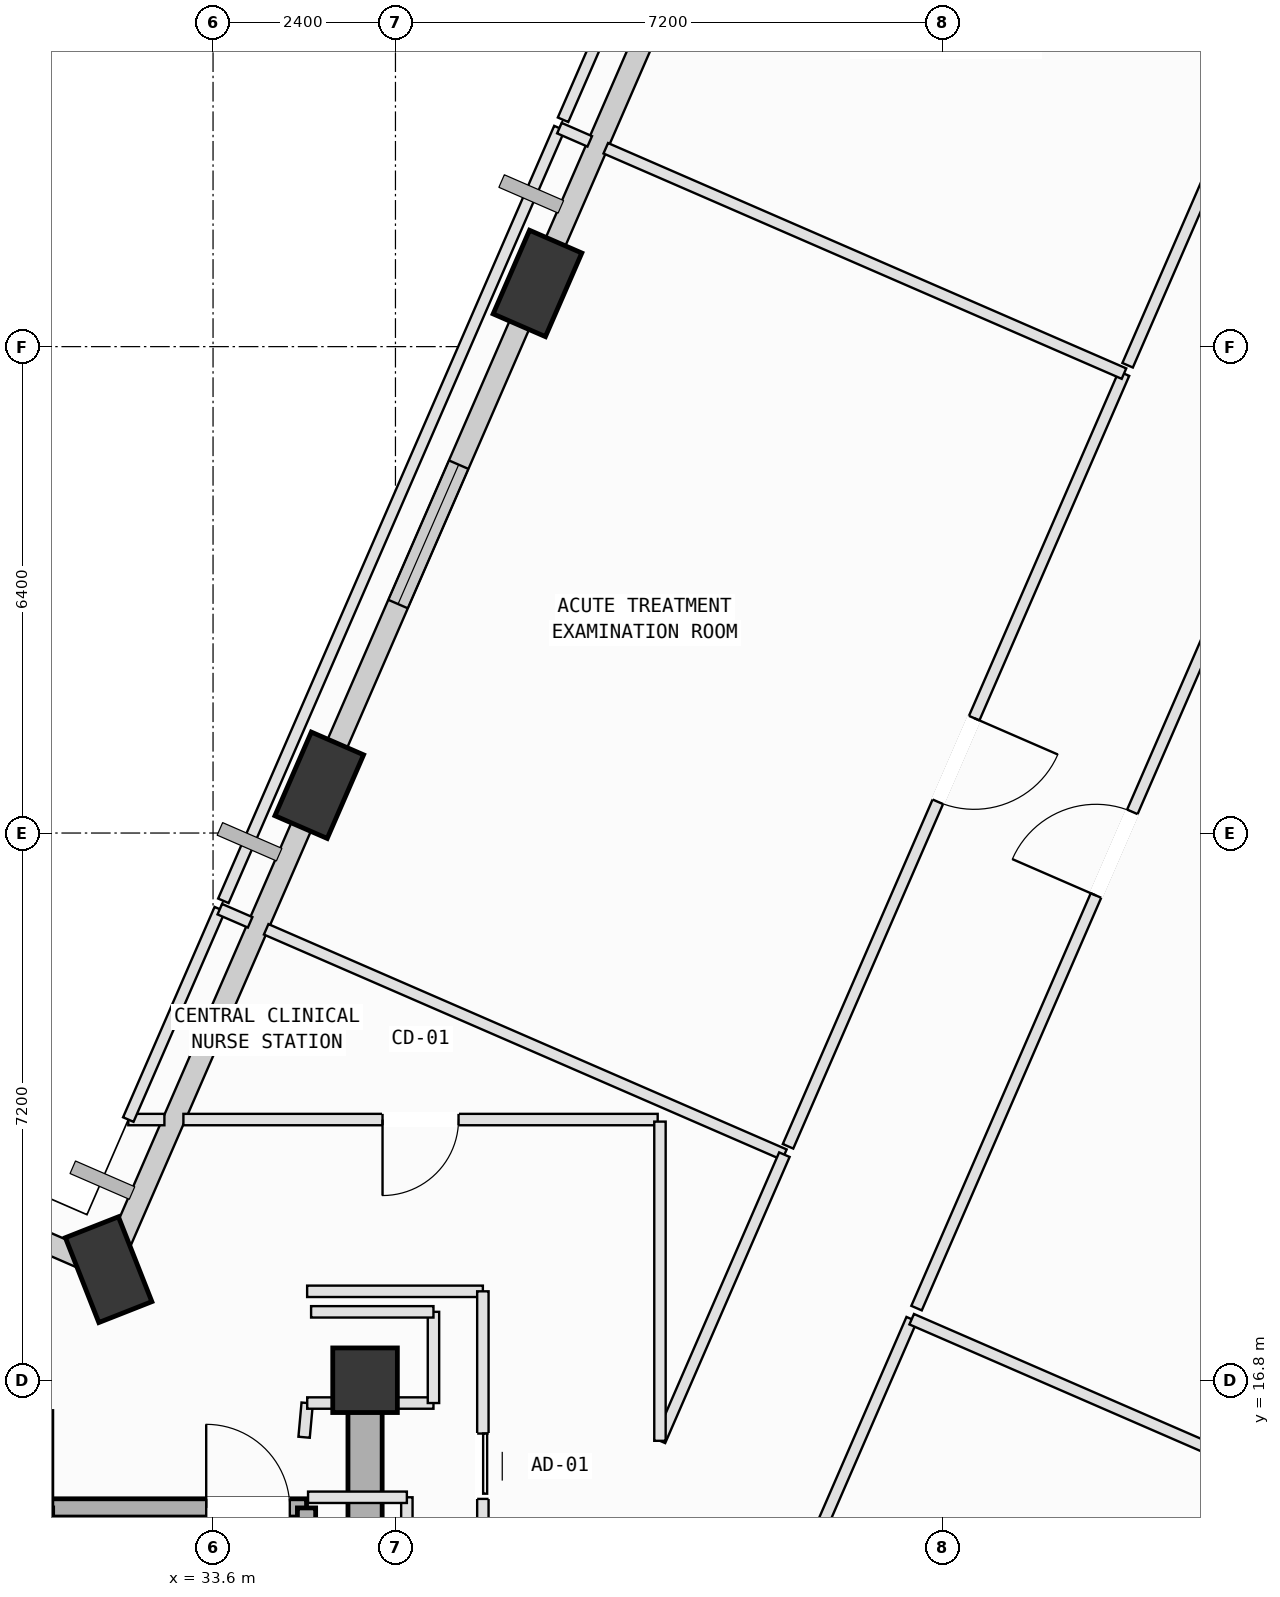
"""IFC4 building model, lengths in metres.
Left out: names, types, materials, properties, quantities, classifications, styles, units other than length and angle.
Written with IfcOpenShell. Run it as: python <this file> out.ifc"""

import sys

from ifc_helpers import new_model, si_unit, direction, frame, frame_2d, origin, origin_2d, place, context, subcontext, project, spatial, rectangle, extrude, element, fill, save


model = new_model("IFC4")
c1 = context("Model", 3, precision=1e-05, world=origin(), true_north=direction((0.0, 1.0)))
c2 = subcontext(c1, "Body", "Model", "MODEL_VIEW")
j1 = project(units=[si_unit("LENGTHUNIT", "METRE"), si_unit("PLANEANGLEUNIT", "RADIAN")], contexts=[c1])
p1 = place(None, origin())
s1 = spatial("IfcSite", under=j1, at=p1, CompositionType="ELEMENT")
p2 = place(p1, origin())
s2 = spatial("IfcBuilding", under=s1, at=p2, CompositionType="ELEMENT")
p3 = place(p2, frame((0.0, 0.0, 316.6)))
s3 = spatial("IfcBuildingStorey", under=s2, at=p3, CompositionType="ELEMENT", Elevation=316.6)
p4 = place(p3, frame((35.6, 16.8, 0.0), z_axis=(0.0, 0.0, 1.0), x_axis=(1.0, 0.0, 0.0)))
e1 = element("IfcColumn", 1, at=p4, inside=s3, PredefinedType="COLUMN", context=c2, shape_type="SweptSolid", body=[
    extrude(rectangle(XDim=0.85, YDim=0.85, at=origin_2d()), origin(), (0.0, 0.0, 1.0), 4.0),
])
for number, where, z_axis, x_axis in (
    (2, (37.868, 31.231, 0.002), (0.0, 0.0, 1.0), (0.399, 0.917, 0.0)),
    (3, (34.998, 24.628, 0.002), (0.0, 0.0, 1.0), (0.399, 0.917, 0.0)),
    (4, (32.226, 18.255, 0.002), (0.0, 0.0, 1.0), (-0.367, 0.93, 0.0)),
):
    element("IfcColumn", number, at=place(p3, frame(where, z_axis=z_axis, x_axis=x_axis)), inside=s3, PredefinedType="COLUMN", context=c2, shape_type="SweptSolid", body=[
        extrude(rectangle(XDim=1.2, YDim=0.75, at=origin_2d()), origin(), (0.0, 0.0, 1.0), 3.996),
    ])
p5 = place(p3, frame((38.027, 31.596, 0.0), z_axis=(0.0, 0.0, 1.0), x_axis=(0.398764437463, 0.917053391802, 0.0)))
e5 = element("IfcWall", 5, at=p5, inside=s3, PredefinedType="SOLIDWALL", context=c2, shape_type="SweptSolid", body=[
    extrude(rectangle(XDim=6.755, YDim=0.28, at=frame_2d((3.377, 0.0))), origin(), (0.0, 0.0, 1.0), 3.265),
])
p6 = place(p5, frame((3.538, 0.0, 0.75)))
e6 = element("IfcOpeningElement", 6, at=p6, cuts=e5, PredefinedType="OPENING", context=c2, shape_type="SweptSolid", body=[
    extrude(rectangle(XDim=1.6, YDim=1.95, at=frame_2d((0.8, 0.975))), frame((0.0, 0.15, 0.0), z_axis=(0.0, -1.0, 0.0), x_axis=(1.0, 0.0, 0.0)), (0.0, 0.0, 1.0), 0.3),
])
p7 = place(p3, frame((35.156, 24.993, 0.0), z_axis=(0.0, 0.0, 1.0), x_axis=(0.398758169539, 0.917056117272, 0.0)))
e7 = element("IfcWall", 7, at=p7, inside=s3, PredefinedType="SOLIDWALL", context=c2, shape_type="SweptSolid", body=[
    extrude(rectangle(XDim=6.405, YDim=0.28, at=frame_2d((3.202, 0.0))), origin(), (0.0, 0.0, 1.0), 3.265),
])
p8 = place(p7, frame((2.202, 0.0, 0.75)))
e8 = element("IfcOpeningElement", 8, at=p8, cuts=e7, PredefinedType="OPENING", context=c2, shape_type="SweptSolid", body=[
    extrude(rectangle(XDim=2.0, YDim=1.95, at=frame_2d((1.0, 0.975))), frame((0.0, 0.15, 0.0), z_axis=(0.0, -1.0, 0.0), x_axis=(1.0, 0.0, 0.0)), (0.0, 0.0, 1.0), 0.3),
])
p9 = place(p3, frame((32.385, 18.619, 0.0), z_axis=(0.0, 0.0, 1.0), x_axis=(0.398753668733, 0.917058074318, 0.0)))
e9 = element("IfcWall", 9, at=p9, inside=s3, PredefinedType="SOLIDWALL", context=c2, shape_type="SweptSolid", body=[
    extrude(rectangle(XDim=6.155, YDim=0.28, at=frame_2d((3.078, 0.0))), origin(), (0.0, 0.0, 1.0), 3.265),
])
p10 = place(p3, frame((25.484, 21.187, 0.0), z_axis=(0.0, 0.0, 1.0), x_axis=(0.917060568388, -0.398747932794, 0.0)))
e10 = element("IfcWall", 10, at=p10, inside=s3, PredefinedType="SOLIDWALL", context=c2, shape_type="SweptSolid", body=[
    extrude(rectangle(XDim=6.955, YDim=0.28, at=frame_2d((3.478, 0.0))), origin(), (0.0, 0.0, 1.0), 2.765),
])
p11 = place(p3, frame((31.37, 15.12, 0.0), z_axis=(0.0, 0.0, 1.0), x_axis=(1.0, 0.0, 0.0)))
e11 = element("IfcWall", 11, at=p11, inside=s3, PredefinedType="SOLIDWALL", context=c2, shape_type="SweptSolid", body=[
    extrude(rectangle(XDim=3.46, YDim=0.24, at=frame_2d((1.73, 0.0))), origin(), (0.0, 0.0, 1.0), 3.78),
])
p12 = place(p11, frame((2.14, 0.0, 0.0)))
e12 = element("IfcOpeningElement", 12, at=p12, cuts=e11, PredefinedType="OPENING", context=c2, shape_type="SweptSolid", body=[
    extrude(rectangle(XDim=1.1, YDim=2.15, at=frame_2d((0.55, 1.075))), frame((0.0, 0.13, 0.0), z_axis=(0.0, -1.0, 0.0), x_axis=(1.0, 0.0, 0.0)), (0.0, 0.0, 1.0), 0.26),
])
for number, where, z_axis, x_axis in (
    (13, (34.83, 15.12, 0.0), (0.0, 0.0, 1.0), (0.0, -1.0, 0.0)),
    (14, (31.37, 8.025, 0.0), (0.0, 0.0, 1.0), (0.0, 1.0, 0.0)),
):
    element("IfcWall", number, at=place(p3, frame(where, z_axis=z_axis, x_axis=x_axis)), inside=s3, PredefinedType="SOLIDWALL", context=c2, shape_type="SweptSolid", body=[
        extrude(rectangle(XDim=7.095, YDim=0.24, at=frame_2d((3.548, 0.0))), origin(), (0.0, 0.0, 1.0), 3.78),
    ])
p13 = place(p3, frame((35.6, 7.8, 0.0), z_axis=(0.0, 0.0, 1.0), x_axis=(0.0, 1.0, 0.0)))
e15 = element("IfcWall", 15, at=p13, inside=s3, PredefinedType="SHEAR", context=c2, shape_type="SweptSolid", body=[
    extrude(rectangle(XDim=9.0, YDim=0.45, at=frame_2d((4.5, 0.0))), origin(), (0.0, 0.0, 1.0), 3.78),
])
p14 = place(p3, frame((39.48, 9.984, 0.0), z_axis=(0.0, 0.0, 1.0), x_axis=(0.398659488131, 0.917099020021, 0.0)))
e16 = element("IfcWall", 16, at=p14, inside=s3, PredefinedType="PARTITIONING", context=c2, shape_type="SweptSolid", body=[
    extrude(rectangle(XDim=8.308, YDim=0.15, at=frame_2d((4.154, 0.0))), origin(), (0.0, 0.0, 1.0), 3.78),
])
p15 = place(p14, frame((3.554, 0.0, 0.0)))
e17 = element("IfcOpeningElement", 17, at=p15, cuts=e16, PredefinedType="OPENING", context=c2, shape_type="SweptSolid", body=[
    extrude(rectangle(XDim=1.2, YDim=2.15, at=frame_2d((0.6, 1.075))), frame((0.0, 0.085, 0.0), z_axis=(0.0, -1.0, 0.0), x_axis=(1.0, 0.0, 0.0)), (0.0, 0.0, 1.0), 0.17),
])
p16 = place(p3, frame((42.792, 17.603, 0.0), z_axis=(0.0, 0.0, 1.0), x_axis=(0.917063112739, -0.398742081117, 0.0)))
e18 = element("IfcWall", 18, at=p16, inside=s3, PredefinedType="PARTITIONING", context=c2, shape_type="SweptSolid", body=[
    extrude(rectangle(XDim=11.18, YDim=0.15, at=frame_2d((5.59, 0.0))), origin(), (0.0, 0.0, 1.0), 3.78),
])
p17 = place(p3, frame((42.856, 17.749, 0.0), z_axis=(0.0, 0.0, 1.0), x_axis=(0.398751440491, 0.917059043195, 0.0)))
e19 = element("IfcWall", 19, at=p17, inside=s3, PredefinedType="PARTITIONING", context=c2, shape_type="SweptSolid", body=[
    extrude(rectangle(XDim=13.041, YDim=0.15, at=frame_2d((6.52, 0.0))), origin(), (0.0, 0.0, 1.0), 3.78),
])
p18 = place(p17, frame((5.92, 0.0, 0.0)))
e20 = element("IfcOpeningElement", 20, at=p18, cuts=e19, PredefinedType="OPENING", context=c2, shape_type="SweptSolid", body=[
    extrude(rectangle(XDim=1.2, YDim=2.15, at=frame_2d((0.6, 1.075))), frame((0.0, 0.085, 0.0), z_axis=(0.0, -1.0, 0.0), x_axis=(1.0, 0.0, 0.0)), (0.0, 0.0, 1.0), 0.17),
])
p19 = place(p3, frame((39.45, 20.23, 0.0), z_axis=(0.0, 0.0, 1.0), x_axis=(-1.0, 0.0, 0.0)))
e21 = element("IfcWall", 21, at=p19, inside=s3, PredefinedType="PARTITIONING", context=c2, shape_type="SweptSolid", body=[
    extrude(rectangle(XDim=6.24, YDim=0.15, at=frame_2d((3.12, 0.0))), origin(), (0.0, 0.0, 1.0), 3.78),
])
p20 = place(p19, frame((2.62, 0.0, 0.0)))
e22 = element("IfcOpeningElement", 22, at=p20, cuts=e21, PredefinedType="OPENING", context=c2, shape_type="SweptSolid", body=[
    extrude(rectangle(XDim=1.0, YDim=2.12, at=frame_2d((0.5, 1.06))), frame((0.0, 0.085, 0.0), z_axis=(0.0, -1.0, 0.0), x_axis=(1.0, 0.0, 0.0)), (0.0, 0.0, 1.0), 0.17),
])
p21 = place(p3, frame((32.96, 20.23, 0.0), z_axis=(0.0, 0.0, 1.0), x_axis=(-1.0, 0.0, 0.0)))
e23 = element("IfcWall", 23, at=p21, inside=s3, PredefinedType="PARTITIONING", context=c2, shape_type="SweptSolid", body=[
    extrude(rectangle(XDim=0.475, YDim=0.15, at=frame_2d((0.237, 0.0))), origin(), (0.0, 0.0, 1.0), 3.78),
])
p22 = place(p3, frame((32.485, 20.23, 0.0), z_axis=(0.0, 0.0, 1.0), x_axis=(0.398823706297, 0.917027617521, 0.0)))
e24 = element("IfcWall", 24, at=p22, inside=s3, PredefinedType="PARTITIONING", context=c2, shape_type="SweptSolid", body=[
    extrude(rectangle(XDim=3.019, YDim=0.15, at=frame_2d((1.509, 0.0))), origin(), (0.0, 0.0, 1.0), 3.78),
])
p23 = place(p3, frame((33.689, 22.998, 0.0), z_axis=(0.0, 0.0, 1.0), x_axis=(0.91736435201, -0.398048546864, 0.0)))
e25 = element("IfcWall", 25, at=p23, inside=s3, PredefinedType="PARTITIONING", context=c2, shape_type="SweptSolid", body=[
    extrude(rectangle(XDim=0.435, YDim=0.15, at=frame_2d((0.217, 0.0))), origin(), (0.0, 0.0, 1.0), 3.78),
])
p24 = place(p3, frame((34.299, 22.733, 0.0), z_axis=(0.0, 0.0, 1.0), x_axis=(0.917042906391, -0.398788550284, 0.0)))
e26 = element("IfcWall", 26, at=p24, inside=s3, PredefinedType="PARTITIONING", context=c2, shape_type="SweptSolid", body=[
    extrude(rectangle(XDim=7.435, YDim=0.15, at=frame_2d((3.717, 0.0))), origin(), (0.0, 0.0, 1.0), 3.78),
])
p25 = place(p3, frame((41.117, 19.768, 0.0), z_axis=(0.0, 0.0, 1.0), x_axis=(-0.398715239341, -0.917074783165, 0.0)))
e27 = element("IfcWall", 27, at=p25, inside=s3, PredefinedType="PARTITIONING", context=c2, shape_type="SweptSolid", body=[
    extrude(rectangle(XDim=4.106, YDim=0.15, at=frame_2d((2.053, 0.0))), origin(), (0.0, 0.0, 1.0), 3.78),
])
p26 = place(p3, frame((39.48, 16.003, 0.0), z_axis=(0.0, 0.0, 1.0), x_axis=(0.0, 1.0, 0.0)))
e28 = element("IfcWall", 28, at=p26, inside=s3, PredefinedType="PARTITIONING", context=c2, shape_type="SweptSolid", body=[
    extrude(rectangle(XDim=4.2, YDim=0.15, at=frame_2d((2.1, 0.0))), origin(), (0.0, 0.0, 1.0), 3.78),
])
p27 = place(p3, frame((45.585, 30.045, 0.0), z_axis=(0.0, 0.0, 1.0), x_axis=(-0.398687458661, -0.91708686083, 0.0)))
e29 = element("IfcWall", 29, at=p27, inside=s3, PredefinedType="PARTITIONING", context=c2, shape_type="SweptSolid", body=[
    extrude(rectangle(XDim=11.086, YDim=0.15, at=frame_2d((5.543, 0.0))), origin(), (0.0, 0.0, 1.0), 2.765),
])
p28 = place(p27, frame((4.943, 0.0, 0.0)))
e30 = element("IfcOpeningElement", 30, at=p28, cuts=e29, PredefinedType="OPENING", context=c2, shape_type="SweptSolid", body=[
    extrude(rectangle(XDim=1.2, YDim=2.15, at=frame_2d((0.6, 1.075))), frame((0.0, 0.085, 0.0), z_axis=(0.0, -1.0, 0.0), x_axis=(1.0, 0.0, 0.0)), (0.0, 0.0, 1.0), 0.17),
])
p29 = place(p3, frame((33.736, 23.108, 0.0), z_axis=(0.0, 0.0, 1.0), x_axis=(0.398761541239, 0.917054651168, 0.0)))
e31 = element("IfcWall", 31, at=p29, inside=s3, PredefinedType="PARTITIONING", context=c2, shape_type="SweptSolid", body=[
    extrude(rectangle(XDim=11.087, YDim=0.15, at=frame_2d((5.543, 0.0))), origin(), (0.0, 0.0, 1.0), 3.78),
])
p30 = place(p3, frame((38.157, 33.275, 0.0), z_axis=(0.0, 0.0, 1.0), x_axis=(0.916748651636, -0.399464528742, 0.0)))
e32 = element("IfcWall", 32, at=p30, inside=s3, PredefinedType="PARTITIONING", context=c2, shape_type="SweptSolid", body=[
    extrude(rectangle(XDim=0.435, YDim=0.15, at=frame_2d((0.218, 0.0))), origin(), (0.0, 0.0, 1.0), 3.78),
])
p31 = place(p3, frame((38.767, 33.01, 0.0), z_axis=(0.0, 0.0, 1.0), x_axis=(0.917030896956, -0.398816165707, 0.0)))
e33 = element("IfcWall", 33, at=p31, inside=s3, PredefinedType="PARTITIONING", context=c2, shape_type="SweptSolid", body=[
    extrude(rectangle(XDim=7.435, YDim=0.15, at=frame_2d((3.717, 0.0))), origin(), (0.0, 0.0, 1.0), 3.78),
])
p32 = place(p3, frame((48.222, 36.108, 0.0), z_axis=(0.0, 0.0, 1.0), x_axis=(-0.398811373886, -0.9170329809, 0.0)))
e34 = element("IfcWall", 34, at=p32, inside=s3, PredefinedType="PARTITIONING", context=c2, shape_type="SweptSolid", body=[
    extrude(rectangle(XDim=6.491, YDim=0.15, at=frame_2d((3.246, 0.0))), origin(), (0.0, 0.0, 1.0), 2.765),
])
p33 = place(p32, frame((2.646, 0.0, 0.0)))
e35 = element("IfcOpeningElement", 35, at=p33, cuts=e34, PredefinedType="OPENING", context=c2, shape_type="SweptSolid", body=[
    extrude(rectangle(XDim=1.2, YDim=2.15, at=frame_2d((0.6, 1.075))), frame((0.0, 0.085, 0.0), z_axis=(0.0, -1.0, 0.0), x_axis=(1.0, 0.0, 0.0)), (0.0, 0.0, 1.0), 0.17),
])
p34 = place(p3, frame((38.205, 33.385, 0.0), z_axis=(0.0, 0.0, 1.0), x_axis=(0.398763364975, 0.917053858153, 0.0)))
e36 = element("IfcWall", 36, at=p34, inside=s3, PredefinedType="PARTITIONING", context=c2, shape_type="SweptSolid", body=[
    extrude(rectangle(XDim=5.991, YDim=0.15, at=frame_2d((2.995, 0.0))), origin(), (0.0, 0.0, 1.0), 3.78),
])
p35 = place(p3, frame((34.798, 16.05, 0.0), z_axis=(0.0, 0.0, 1.0), x_axis=(0.090779345207, 0.99587103105, 0.0)))
e37 = element("IfcWall", 37, at=p35, inside=s3, PredefinedType="PARTITIONING", context=c2, shape_type="SweptSolid", body=[
    extrude(rectangle(XDim=0.452, YDim=0.15, at=frame_2d((0.226, 0.0))), origin(), (0.0, 0.0, 1.0), 3.78),
])
p36 = place(p3, frame((34.839, 16.5, 0.0), z_axis=(0.0, 0.0, 1.0), x_axis=(1.0, 0.0, 0.0)))
e38 = element("IfcWall", 38, at=p36, inside=s3, PredefinedType="PARTITIONING", context=c2, shape_type="SweptSolid", body=[
    extrude(rectangle(XDim=1.661, YDim=0.15, at=frame_2d((0.831, 0.0))), origin(), (0.0, 0.0, 1.0), 2.765),
])
p37 = place(p3, frame((36.5, 16.5, 0.0), z_axis=(0.0, 0.0, 1.0), x_axis=(0.0, 1.0, 0.0)))
e39 = element("IfcWall", 39, at=p37, inside=s3, PredefinedType="PARTITIONING", context=c2, shape_type="SweptSolid", body=[
    extrude(rectangle(XDim=1.2, YDim=0.15, at=frame_2d((0.6, 0.0))), origin(), (0.0, 0.0, 1.0), 3.78),
])
p38 = place(p3, frame((36.5, 17.7, 0.0), z_axis=(0.0, 0.0, 1.0), x_axis=(-1.0, 0.0, 0.0)))
e40 = element("IfcWall", 40, at=p38, inside=s3, PredefinedType="PARTITIONING", context=c2, shape_type="SweptSolid", body=[
    extrude(rectangle(XDim=1.61, YDim=0.15, at=frame_2d((0.805, 0.0))), origin(), (0.0, 0.0, 1.0), 3.78),
])
p39 = place(p3, frame((34.838, 17.97, 0.0), z_axis=(0.0, 0.0, 1.0), x_axis=(1.0, 0.0, 0.0)))
e41 = element("IfcWall", 41, at=p39, inside=s3, PredefinedType="PARTITIONING", context=c2, shape_type="SweptSolid", body=[
    extrude(rectangle(XDim=2.312, YDim=0.15, at=frame_2d((1.156, 0.0))), origin(), (0.0, 0.0, 1.0), 3.78),
])
p40 = place(p3, frame((37.15, 17.97, 0.0), z_axis=(0.0, 0.0, 1.0), x_axis=(0.0, -1.0, 0.0)))
e42 = element("IfcWall", 42, at=p40, inside=s3, PredefinedType="PARTITIONING", context=c2, shape_type="SweptSolid", body=[
    extrude(rectangle(XDim=5.967, YDim=0.15, at=frame_2d((2.983, 0.0))), origin(), (0.0, 0.0, 1.0), 3.78),
])
p41 = place(p40, frame((1.871, 0.0, 0.0)))
e43 = element("IfcOpeningElement", 43, at=p41, cuts=e42, PredefinedType="OPENING", context=c2, shape_type="SweptSolid", body=[
    extrude(rectangle(XDim=0.86, YDim=2.06, at=frame_2d((0.43, 1.03))), frame((0.0, 0.085, 0.0), z_axis=(0.0, -1.0, 0.0), x_axis=(1.0, 0.0, 0.0)), (0.0, 0.0, 1.0), 0.17),
])
p42 = place(p3, frame((36.15, 12.438, 0.0), z_axis=(0.0, 0.0, 1.0), x_axis=(0.0, 1.0, 0.0)))
e44 = element("IfcWall", 44, at=p42, inside=s3, PredefinedType="PARTITIONING", context=c2, shape_type="SweptSolid", body=[
    extrude(rectangle(XDim=2.822, YDim=0.15, at=frame_2d((1.411, 0.0))), origin(), (0.0, 0.0, 1.0), 3.78),
])
p43 = place(p3, frame((36.15, 15.26, 0.0), z_axis=(0.0, 0.0, 1.0), x_axis=(-1.0, 0.0, 0.0)))
e45 = element("IfcWall", 45, at=p43, inside=s3, PredefinedType="PARTITIONING", context=c2, shape_type="SweptSolid", body=[
    extrude(rectangle(XDim=1.3, YDim=0.15, at=frame_2d((0.65, 0.0))), origin(), (0.0, 0.0, 1.0), 3.78),
])
p44 = place(p8, origin())
e46 = element("IfcWindow", 46, at=p44, inside=s3, PartitioningType="SINGLE_PANEL", PredefinedType="WINDOW", context=c2, shape_type="SweptSolid", body=[
    extrude(rectangle(XDim=2.0, YDim=1.95, at=frame_2d((1.0, 0.975))), frame((0.0, 0.03, 0.0), z_axis=(0.0, -1.0, 0.0), x_axis=(1.0, 0.0, 0.0)), (0.0, 0.0, 1.0), 0.06),
])
fill(e8, e46)
p45 = place(p12, origin())
e47 = element("IfcDoor", 47, at=p45, inside=s3, OperationType="SINGLE_SWING_LEFT", PredefinedType="DOOR", context=c2, shape_type="SweptSolid", body=[
    extrude(rectangle(XDim=1.1, YDim=2.15, at=frame_2d((0.55, 1.075))), frame((0.0, 0.025, 0.0), z_axis=(0.0, -1.0, 0.0), x_axis=(1.0, 0.0, 0.0)), (0.0, 0.0, 1.0), 0.05),
])
fill(e12, e47)
p46 = place(p18, origin())
e48 = element("IfcDoor", 48, at=p46, inside=s3, OperationType="SINGLE_SWING_LEFT", PredefinedType="DOOR", context=c2, shape_type="SweptSolid", body=[
    extrude(rectangle(XDim=1.2, YDim=2.15, at=frame_2d((0.6, 1.075))), frame((0.0, 0.025, 0.0), z_axis=(0.0, -1.0, 0.0), x_axis=(1.0, 0.0, 0.0)), (0.0, 0.0, 1.0), 0.05),
])
fill(e20, e48)
p47 = place(p20, origin())
e49 = element("IfcDoor", 49, at=p47, inside=s3, OperationType="SINGLE_SWING_RIGHT", PredefinedType="DOOR", context=c2, shape_type="SweptSolid", body=[
    extrude(rectangle(XDim=1.0, YDim=2.12, at=frame_2d((0.5, 1.06))), frame((0.0, 0.025, 0.0), z_axis=(0.0, -1.0, 0.0), x_axis=(1.0, 0.0, 0.0)), (0.0, 0.0, 1.0), 0.05),
])
fill(e22, e49)
p48 = place(p28, origin())
e50 = element("IfcDoor", 50, at=p48, inside=s3, OperationType="SINGLE_SWING_LEFT", PredefinedType="DOOR", context=c2, shape_type="SweptSolid", body=[
    extrude(rectangle(XDim=1.2, YDim=2.15, at=frame_2d((0.6, 1.075))), frame((0.0, 0.025, 0.0), z_axis=(0.0, -1.0, 0.0), x_axis=(1.0, 0.0, 0.0)), (0.0, 0.0, 1.0), 0.05),
])
fill(e30, e50)
p49 = place(p41, origin())
e51 = element("IfcDoor", 51, at=p49, inside=s3, OperationType="SLIDING_TO_LEFT", PredefinedType="DOOR", context=c2, shape_type="SweptSolid", body=[
    extrude(rectangle(XDim=0.86, YDim=2.06, at=frame_2d((0.43, 1.03))), frame((0.0, 0.025, 0.0), z_axis=(0.0, -1.0, 0.0), x_axis=(1.0, 0.0, 0.0)), (0.0, 0.0, 1.0), 0.05),
])
fill(e43, e51)
save(model, sys.argv[1])
